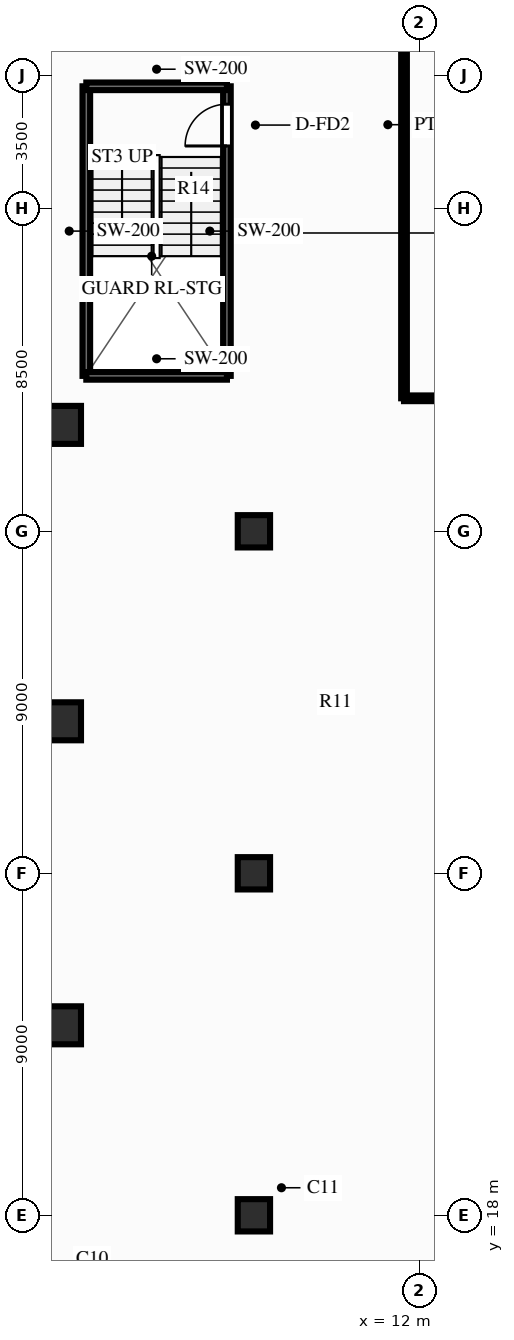
"""IFC4 building model, lengths in metres.
Left out: names, types, materials, properties, quantities, classifications, styles, units other than length and angle.
Written with IfcOpenShell. Run it as: python <this file> out.ifc"""

import sys

from ifc_helpers import new_model, si_unit, direction, frame, frame_2d, origin, origin_2d, place, context, subcontext, project, spatial, rectangle, circle, extrude, source, transform, mapped, element, fill, save


model = new_model("IFC4")
c1 = context("Model", 3, precision=1e-05, world=origin(), true_north=direction((0.0, 1.0)))
c2 = subcontext(c1, "Body", "Model", "MODEL_VIEW")
j1 = project(units=[si_unit("LENGTHUNIT", "METRE"), si_unit("PLANEANGLEUNIT", "RADIAN")], contexts=[c1])
p1 = place(None, origin())
s1 = spatial("IfcSite", under=j1, at=p1, CompositionType="ELEMENT")
p2 = place(p1, origin())
s2 = spatial("IfcBuilding", under=s1, at=p2, CompositionType="ELEMENT")
p3 = place(p2, frame((0.0, 0.0, 11.4)))
s3 = spatial("IfcBuildingStorey", under=s2, at=p3, CompositionType="ELEMENT", Elevation=11.4)
m1 = source(origin(), c2, "Body", "SweptSolid", [
    extrude(circle(Radius=0.5, at=origin_2d()), origin(), (0.0, 0.0, 1.0), 3.6),
])
for number, where, z_axis, x_axis in (
    (1, (2.6, 23.0, 0.0), (0.0, 0.0, 1.0), (1.0, 0.0, 0.0)),
    (2, (2.6, 31.0, 0.0), (0.0, 0.0, 1.0), (1.0, 0.0, 0.0)),
    (3, (2.6, 38.8, 0.0), (0.0, 0.0, 1.0), (1.0, 0.0, 0.0)),
):
    element("IfcColumn", number, at=place(p3, frame(where, z_axis=z_axis, x_axis=x_axis)), inside=s3, PredefinedType="COLUMN", context=c2, shape_type="MappedRepresentation", body=[
        mapped(m1, transform((0.0, 0.0, 0.0), scale=1.0)),
    ])
m2 = source(origin(), c2, "Body", "SweptSolid", [
    extrude(circle(Radius=0.425, at=origin_2d()), origin(), (0.0, 0.0, 1.0), 3.6),
])
for number, where, z_axis, x_axis in (
    (4, (7.65, 18.0, 0.0), (0.0, 0.0, 1.0), (1.0, 0.0, 0.0)),
    (5, (7.65, 27.0, 0.0), (0.0, 0.0, 1.0), (1.0, 0.0, 0.0)),
    (6, (7.65, 36.0, 0.0), (0.0, 0.0, 1.0), (1.0, 0.0, 0.0)),
):
    element("IfcColumn", number, at=place(p3, frame(where, z_axis=z_axis, x_axis=x_axis)), inside=s3, PredefinedType="COLUMN", context=c2, shape_type="MappedRepresentation", body=[
        mapped(m2, transform((0.0, 0.0, 0.0), scale=1.0)),
    ])
p4 = place(p3, frame((3.24, 40.09, 0.0), z_axis=(0.0, 0.0, 1.0), x_axis=(0.0, 1.0, 0.0)))
e7 = element("IfcWall", 7, at=p4, inside=s3, PredefinedType="SOLIDWALL", context=c2, shape_type="SweptSolid", body=[
    extrude(rectangle(XDim=7.62, YDim=0.2, at=frame_2d((3.81, 0.0))), origin(), (0.0, 0.0, 1.0), 3.25),
])
p5 = place(p3, frame((6.94, 40.09, 0.0), z_axis=(0.0, 0.0, 1.0), x_axis=(0.0, 1.0, 0.0)))
e8 = element("IfcWall", 8, at=p5, inside=s3, PredefinedType="SOLIDWALL", context=c2, shape_type="SweptSolid", body=[
    extrude(rectangle(XDim=7.62, YDim=0.2, at=frame_2d((3.81, 0.0))), origin(), (0.0, 0.0, 1.0), 3.25),
])
p6 = place(p5, frame((7.15, 0.0, 0.0), z_axis=(0.0, 0.0, 1.0), x_axis=(-1.0, 0.0, 0.0)))
e9 = element("IfcOpeningElement", 9, at=p6, cuts=e8, PredefinedType="OPENING", context=c2, shape_type="SweptSolid", body=[
    extrude(rectangle(XDim=1.1, YDim=2.15, at=frame_2d((0.55, 1.075))), frame((0.0, 0.112, 0.0), z_axis=(0.0, -1.0, 0.0), x_axis=(1.0, 0.0, 0.0)), (0.0, 0.0, 1.0), 0.224),
])
for number, where, z_axis, x_axis in (
    (10, (3.24, 40.09, 0.0), (0.0, 0.0, 1.0), (1.0, 0.0, 0.0)),
    (11, (3.24, 47.71, 0.0), (0.0, 0.0, 1.0), (1.0, 0.0, 0.0)),
):
    element("IfcWall", number, at=place(p3, frame(where, z_axis=z_axis, x_axis=x_axis)), inside=s3, PredefinedType="SOLIDWALL", context=c2, shape_type="SweptSolid", body=[
        extrude(rectangle(XDim=3.7, YDim=0.2, at=frame_2d((1.85, 0.0))), origin(), (0.0, 0.0, 1.0), 3.25),
    ])
p7 = place(p3, frame((11.6, 39.5, 0.0), z_axis=(0.0, 0.0, 1.0), x_axis=(1.0, 0.0, 0.0)))
e12 = element("IfcWall", 12, at=p7, inside=s3, PredefinedType="PARTITIONING", context=c2, shape_type="SweptSolid", body=[
    extrude(rectangle(XDim=27.4, YDim=0.15, at=frame_2d((13.7, 0.0))), origin(), (0.0, 0.0, 1.0), 3.25),
])
p8 = place(p7, frame((14.666, 0.0, 0.0)))
e13 = element("IfcOpeningElement", 13, at=p8, cuts=e12, PredefinedType="OPENING", context=c2, shape_type="SweptSolid", body=[
    extrude(rectangle(XDim=1.25, YDim=2.15, at=frame_2d((0.625, 1.075))), frame((0.0, 0.087, 0.0), z_axis=(0.0, -1.0, 0.0), x_axis=(1.0, 0.0, 0.0)), (0.0, 0.0, 1.0), 0.174),
])
p9 = place(p3, frame((11.6, 39.5, 0.0), z_axis=(0.0, 0.0, 1.0), x_axis=(0.0, 1.0, 0.0)))
e14 = element("IfcWall", 14, at=p9, inside=s3, PredefinedType="PARTITIONING", context=c2, shape_type="SweptSolid", body=[
    extrude(rectangle(XDim=14.4, YDim=0.15, at=frame_2d((7.2, 0.0))), origin(), (0.0, 0.0, 1.0), 3.25),
])
m3 = source(origin(), c2, "Body", "SweptSolid", [
    extrude(rectangle(XDim=1.1, YDim=2.15, at=frame_2d((0.55, 1.075))), frame((0.0, 0.025, 0.0), z_axis=(0.0, -1.0, 0.0), x_axis=(1.0, 0.0, 0.0)), (0.0, 0.0, 1.0), 0.05),
])
p10 = place(p6, origin())
e15 = element("IfcDoor", 15, at=p10, inside=s3, OperationType="SINGLE_SWING_RIGHT", PredefinedType="DOOR", context=c2, shape_type="MappedRepresentation", body=[
    mapped(m3, transform((0.0, 0.0, 0.0), scale=1.0)),
])
fill(e9, e15)
save(model, sys.argv[1])
